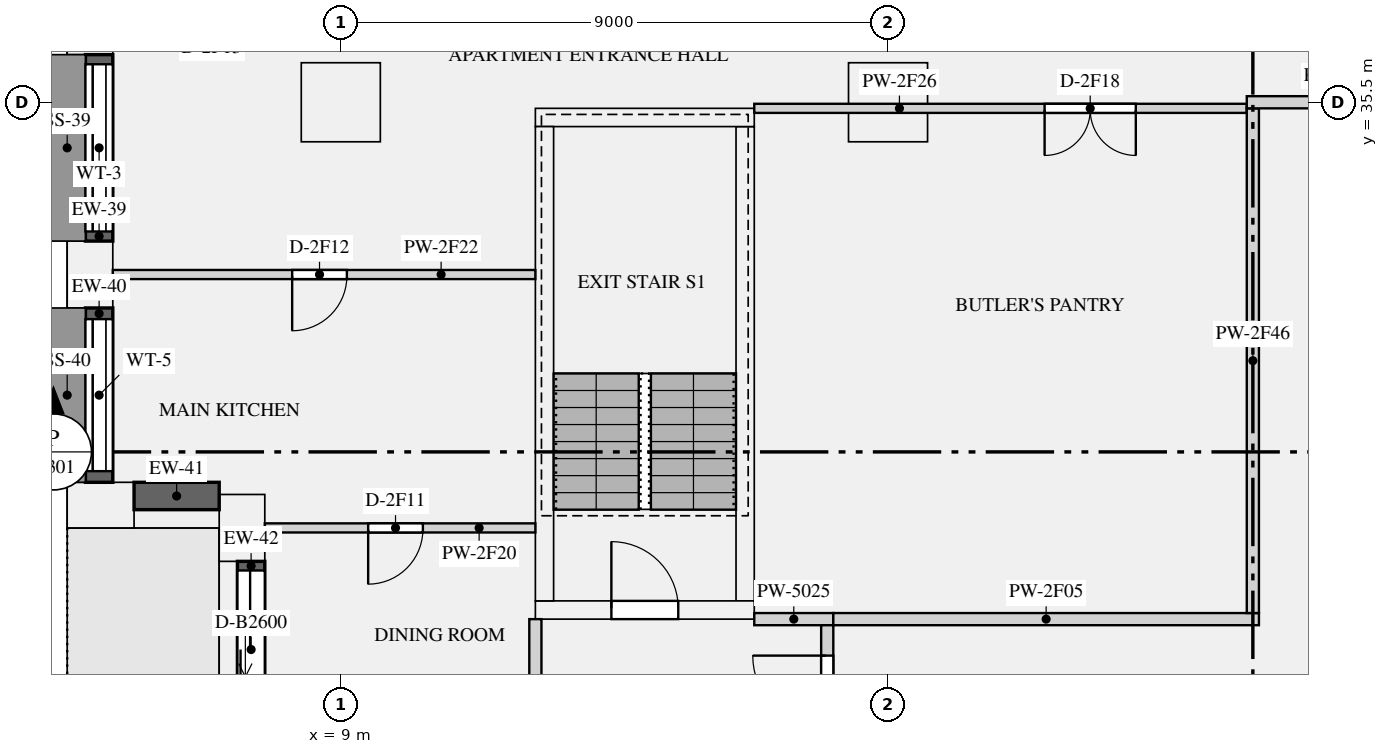
"""IFC4 building model, lengths in metres.
Left out: names, types, materials, properties, quantities, classifications, styles, units other than length and angle.
Written with IfcOpenShell. Run it as: python <this file> out.ifc"""

import sys

from ifc_helpers import new_model, si_unit, direction, frame, frame_2d, origin, origin_2d, place, context, subcontext, project, spatial, rectangle, extrude, element, fill, save


model = new_model("IFC4")
c1 = context("Model", 3, precision=1e-05, world=origin(), true_north=direction((0.0, 1.0)))
c2 = subcontext(c1, "Body", "Model", "MODEL_VIEW")
j1 = project(units=[si_unit("LENGTHUNIT", "METRE"), si_unit("PLANEANGLEUNIT", "RADIAN")], contexts=[c1])
p1 = place(None, origin())
s1 = spatial("IfcSite", under=j1, at=p1, CompositionType="ELEMENT")
p2 = place(p1, origin())
s2 = spatial("IfcBuilding", under=s1, at=p2, CompositionType="ELEMENT")
p3 = place(p2, frame((0.0, 0.0, 127.65)))
s3 = spatial("IfcBuildingStorey", under=s2, at=p3, CompositionType="ELEMENT", Elevation=127.65)
for number, where, z_axis, x_axis in (
    (1, (4.875, 36.833, 0.0), (0.0, 0.0, 1.0), (0.0, -1.0, 0.0)),
    (2, (4.875, 32.667, 0.0), (0.0, 0.0, 1.0), (0.0, -1.0, 0.0)),
    (3, (5.05, 28.875, 0.0), (0.0, 0.0, 1.0), (1.0, 0.0, 0.0)),
    (4, (7.375, 28.5, 0.0), (0.0, 0.0, 1.0), (0.0, -1.0, 0.0)),
):
    element("IfcColumn", number, at=place(p3, frame(where, z_axis=z_axis, x_axis=x_axis)), inside=s3, PredefinedType="USERDEFINED", context=c2, shape_type="SweptSolid", body=[
        extrude(rectangle(XDim=1.1, YDim=0.75, at=origin_2d()), origin(), (0.0, 0.0, 1.0), 3.15),
    ])
for number, where, z_axis, x_axis in (
    (5, (9.0, 35.5, 0.0), (0.0, 0.0, 1.0), (1.0, 0.0, 0.0)),
    (6, (18.0, 35.5, 0.0), (0.0, 0.0, 1.0), (1.0, 0.0, 0.0)),
):
    element("IfcColumn", number, at=place(p3, frame(where, z_axis=z_axis, x_axis=x_axis)), inside=s3, PredefinedType="COLUMN", context=c2, shape_type="SweptSolid", body=[
        extrude(rectangle(XDim=1.3, YDim=1.3, at=origin_2d()), origin(), (0.0, 0.0, 1.0), 3.15),
    ])
p4 = place(p3, frame((12.2, 27.15, 0.0), z_axis=(0.0, 0.0, 1.0), x_axis=(1.0, 0.0, 0.0)))
e7 = element("IfcWall", 7, at=p4, inside=s3, PredefinedType="SHEAR", context=c2, shape_type="SweptSolid", body=[
    extrude(rectangle(XDim=3.6, YDim=0.3, at=frame_2d((1.8, 0.0))), origin(), (0.0, 0.0, 1.0), 3.15),
])
p5 = place(p4, frame((1.25, 0.0, 0.0)))
e8 = element("IfcOpeningElement", 8, at=p5, cuts=e7, PredefinedType="OPENING", context=c2, shape_type="SweptSolid", body=[
    extrude(rectangle(XDim=1.1, YDim=2.1, at=frame_2d((0.55, 1.05))), frame((0.0, 0.16, 0.0), z_axis=(0.0, -1.0, 0.0), x_axis=(1.0, 0.0, 0.0)), (0.0, 0.0, 1.0), 0.32),
])
p6 = place(p3, frame((12.2, 35.25, 0.0), z_axis=(0.0, 0.0, 1.0), x_axis=(1.0, 0.0, 0.0)))
e9 = element("IfcWall", 9, at=p6, inside=s3, PredefinedType="SHEAR", context=c2, shape_type="SweptSolid", body=[
    extrude(rectangle(XDim=3.6, YDim=0.3, at=frame_2d((1.8, 0.0))), origin(), (0.0, 0.0, 1.0), 3.15),
])
for number, where, z_axis, x_axis in (
    (10, (12.35, 27.3, 0.0), (0.0, 0.0, 1.0), (0.0, 1.0, 0.0)),
    (11, (15.65, 27.3, 0.0), (0.0, 0.0, 1.0), (0.0, 1.0, 0.0)),
):
    element("IfcWall", number, at=place(p3, frame(where, z_axis=z_axis, x_axis=x_axis)), inside=s3, PredefinedType="SHEAR", context=c2, shape_type="SweptSolid", body=[
        extrude(rectangle(XDim=7.8, YDim=0.3, at=frame_2d((3.9, 0.0))), origin(), (0.0, 0.0, 1.0), 3.15),
    ])
p7 = place(p3, frame((5.025, 36.283, 0.9), z_axis=(0.0, 0.0, 1.0), x_axis=(0.0, -1.0, 0.0)))
e12 = element("IfcWall", 12, at=p7, inside=s3, PredefinedType="SOLIDWALL", context=c2, shape_type="SweptSolid", body=[
    extrude(rectangle(XDim=3.066, YDim=0.45, at=frame_2d((1.533, 0.0))), origin(), (0.0, 0.0, 1.0), 1.75),
])
p8 = place(p7, frame((0.158, 0.0, 0.15)))
e13 = element("IfcOpeningElement", 13, at=p8, cuts=e12, PredefinedType="OPENING", context=c2, shape_type="SweptSolid", body=[
    extrude(rectangle(XDim=2.75, YDim=1.5, at=frame_2d((1.375, 0.75))), frame((0.0, 0.235, 0.0), z_axis=(0.0, -1.0, 0.0), x_axis=(1.0, 0.0, 0.0)), (0.0, 0.0, 1.0), 0.47),
])
p9 = place(p3, frame((5.025, 32.117, 0.9), z_axis=(0.0, 0.0, 1.0), x_axis=(0.0, -1.0, 0.0)))
e14 = element("IfcWall", 14, at=p9, inside=s3, PredefinedType="SOLIDWALL", context=c2, shape_type="SweptSolid", body=[
    extrude(rectangle(XDim=2.867, YDim=0.45, at=frame_2d((1.434, 0.0))), origin(), (0.0, 0.0, 1.0), 1.75),
])
p10 = place(p9, frame((0.184, 0.0, 0.15)))
e15 = element("IfcOpeningElement", 15, at=p10, cuts=e14, PredefinedType="OPENING", context=c2, shape_type="SweptSolid", body=[
    extrude(rectangle(XDim=2.5, YDim=1.5, at=frame_2d((1.25, 0.75))), frame((0.0, 0.235, 0.0), z_axis=(0.0, -1.0, 0.0), x_axis=(1.0, 0.0, 0.0)), (0.0, 0.0, 1.0), 0.47),
])
p11 = place(p3, frame((5.6, 29.025, 0.9), z_axis=(0.0, 0.0, 1.0), x_axis=(1.0, 0.0, 0.0)))
e16 = element("IfcWall", 16, at=p11, inside=s3, PredefinedType="SOLIDWALL", context=c2, shape_type="SweptSolid", body=[
    extrude(rectangle(XDim=1.4, YDim=0.45, at=frame_2d((0.7, 0.0))), origin(), (0.0, 0.0, 1.0), 1.75),
])
p12 = place(p3, frame((7.525, 27.95, 0.0), z_axis=(0.0, 0.0, 1.0), x_axis=(0.0, -1.0, 0.0)))
e17 = element("IfcWall", 17, at=p12, inside=s3, PredefinedType="SOLIDWALL", context=c2, shape_type="SweptSolid", body=[
    extrude(rectangle(XDim=2.9, YDim=0.45, at=frame_2d((1.45, 0.0))), origin(), (0.0, 0.0, 1.0), 2.65),
])
p13 = place(p12, frame((0.15, 0.0, 0.0)))
e18 = element("IfcOpeningElement", 18, at=p13, cuts=e17, PredefinedType="OPENING", context=c2, shape_type="SweptSolid", body=[
    extrude(rectangle(XDim=2.6, YDim=2.3, at=frame_2d((1.3, 1.15))), frame((0.0, 0.235, 0.0), z_axis=(0.0, -1.0, 0.0), x_axis=(1.0, 0.0, 0.0)), (0.0, 0.0, 1.0), 0.47),
])
p14 = place(p3, frame((15.8, 27.0, 0.0), z_axis=(0.0, 0.0, 1.0), x_axis=(1.0, 0.0, 0.0)))
e19 = element("IfcWall", 19, at=p14, inside=s3, PredefinedType="PARTITIONING", context=c2, shape_type="SweptSolid", body=[
    extrude(rectangle(XDim=1.3, YDim=0.2, at=frame_2d((0.65, 0.0))), origin(), (0.0, 0.0, 1.0), 2.65),
])
p15 = place(p3, frame((12.2, 23.1, 0.0), z_axis=(0.0, 0.0, 1.0), x_axis=(0.0, 1.0, 0.0)))
e20 = element("IfcWall", 20, at=p15, inside=s3, PredefinedType="PARTITIONING", context=c2, shape_type="SweptSolid", body=[
    extrude(rectangle(XDim=3.9, YDim=0.2, at=frame_2d((1.95, 0.0))), origin(), (0.0, 0.0, 1.0), 2.65),
])
p16 = place(p3, frame((17.0, 23.1, 0.0), z_axis=(0.0, 0.0, 1.0), x_axis=(0.0, 1.0, 0.0)))
e21 = element("IfcWall", 21, at=p16, inside=s3, PredefinedType="PARTITIONING", context=c2, shape_type="SweptSolid", body=[
    extrude(rectangle(XDim=3.8, YDim=0.2, at=frame_2d((1.9, 0.0))), origin(), (0.0, 0.0, 1.0), 2.65),
])
p17 = place(p16, frame((2.1, 0.0, 0.0)))
e22 = element("IfcOpeningElement", 22, at=p17, cuts=e21, PredefinedType="OPENING", context=c2, shape_type="SweptSolid", body=[
    extrude(rectangle(XDim=1.2, YDim=2.1, at=frame_2d((0.6, 1.05))), frame((0.0, 0.11, 0.0), z_axis=(0.0, -1.0, 0.0), x_axis=(1.0, 0.0, 0.0)), (0.0, 0.0, 1.0), 0.22),
])
p18 = place(p3, frame((17.1, 27.0, 0.0), z_axis=(0.0, 0.0, 1.0), x_axis=(1.0, 0.0, 0.0)))
e23 = element("IfcWall", 23, at=p18, inside=s3, PredefinedType="PARTITIONING", context=c2, shape_type="SweptSolid", body=[
    extrude(rectangle(XDim=7.0, YDim=0.2, at=frame_2d((3.5, 0.0))), origin(), (0.0, 0.0, 1.0), 2.65),
])
p19 = place(p3, frame((23.9, 35.5, 0.0), z_axis=(0.0, 0.0, 1.0), x_axis=(1.0, 0.0, 0.0)))
e24 = element("IfcWall", 24, at=p19, inside=s3, PredefinedType="PARTITIONING", context=c2, shape_type="SweptSolid", body=[
    extrude(rectangle(XDim=3.1, YDim=0.2, at=frame_2d((1.55, 0.0))), origin(), (0.0, 0.0, 1.0), 2.65),
])
p20 = place(p3, frame((7.75, 28.5, 0.0), z_axis=(0.0, 0.0, 1.0), x_axis=(1.0, 0.0, 0.0)))
e25 = element("IfcWall", 25, at=p20, inside=s3, PredefinedType="PARTITIONING", context=c2, shape_type="SweptSolid", body=[
    extrude(rectangle(XDim=4.45, YDim=0.15, at=frame_2d((2.225, 0.0))), origin(), (0.0, 0.0, 1.0), 2.65),
])
p21 = place(p20, frame((1.7, 0.0, 0.0)))
e26 = element("IfcOpeningElement", 26, at=p21, cuts=e25, PredefinedType="OPENING", context=c2, shape_type="SweptSolid", body=[
    extrude(rectangle(XDim=0.9, YDim=2.1, at=frame_2d((0.45, 1.05))), frame((0.0, 0.085, 0.0), z_axis=(0.0, -1.0, 0.0), x_axis=(1.0, 0.0, 0.0)), (0.0, 0.0, 1.0), 0.17),
])
p22 = place(p3, frame((5.25, 32.667, 0.0), z_axis=(0.0, 0.0, 1.0), x_axis=(1.0, 0.0, 0.0)))
e27 = element("IfcWall", 27, at=p22, inside=s3, PredefinedType="PARTITIONING", context=c2, shape_type="SweptSolid", body=[
    extrude(rectangle(XDim=6.95, YDim=0.15, at=frame_2d((3.475, 0.0))), origin(), (0.0, 0.0, 1.0), 2.65),
])
p23 = place(p22, frame((2.95, 0.0, 0.0)))
e28 = element("IfcOpeningElement", 28, at=p23, cuts=e27, PredefinedType="OPENING", context=c2, shape_type="SweptSolid", body=[
    extrude(rectangle(XDim=0.9, YDim=2.1, at=frame_2d((0.45, 1.05))), frame((0.0, 0.085, 0.0), z_axis=(0.0, -1.0, 0.0), x_axis=(1.0, 0.0, 0.0)), (0.0, 0.0, 1.0), 0.17),
])
p24 = place(p3, frame((15.8, 35.4, 0.0), z_axis=(0.0, 0.0, 1.0), x_axis=(1.0, 0.0, 0.0)))
e29 = element("IfcWall", 29, at=p24, inside=s3, PredefinedType="PARTITIONING", context=c2, shape_type="SweptSolid", body=[
    extrude(rectangle(XDim=8.1, YDim=0.15, at=frame_2d((4.05, 0.0))), origin(), (0.0, 0.0, 1.0), 2.65),
])
p25 = place(p24, frame((4.775, 0.0, 0.0)))
e30 = element("IfcOpeningElement", 30, at=p25, cuts=e29, PredefinedType="OPENING", context=c2, shape_type="SweptSolid", body=[
    extrude(rectangle(XDim=1.5, YDim=2.1, at=frame_2d((0.75, 1.05))), frame((0.0, 0.085, 0.0), z_axis=(0.0, -1.0, 0.0), x_axis=(1.0, 0.0, 0.0)), (0.0, 0.0, 1.0), 0.17),
])
p26 = place(p3, frame((24.0, 27.1, 0.0), z_axis=(0.0, 0.0, 1.0), x_axis=(0.0, 1.0, 0.0)))
e31 = element("IfcWall", 31, at=p26, inside=s3, PredefinedType="PARTITIONING", context=c2, shape_type="SweptSolid", body=[
    extrude(rectangle(XDim=8.3, YDim=0.2, at=frame_2d((4.15, 0.0))), origin(), (0.0, 0.0, 1.0), 2.65),
])
p27 = place(p8, origin())
e32 = element("IfcWindow", 32, at=p27, inside=s3, PartitioningType="SINGLE_PANEL", PredefinedType="WINDOW", context=c2, shape_type="SweptSolid", body=[
    extrude(rectangle(XDim=2.75, YDim=1.5, at=frame_2d((1.375, 0.75))), frame((0.0, -0.065, 0.0), z_axis=(0.0, -1.0, 0.0), x_axis=(1.0, 0.0, 0.0)), (0.0, 0.0, 1.0), 0.06),
])
fill(e13, e32)
p28 = place(p10, origin())
e33 = element("IfcWindow", 33, at=p28, inside=s3, PartitioningType="SINGLE_PANEL", PredefinedType="WINDOW", context=c2, shape_type="SweptSolid", body=[
    extrude(rectangle(XDim=2.5, YDim=1.5, at=frame_2d((1.25, 0.75))), frame((0.0, -0.065, 0.0), z_axis=(0.0, -1.0, 0.0), x_axis=(1.0, 0.0, 0.0)), (0.0, 0.0, 1.0), 0.06),
])
fill(e15, e33)
p29 = place(p13, origin())
e34 = element("IfcDoor", 34, at=p29, inside=s3, OperationType="SLIDING_TO_LEFT", PredefinedType="DOOR", context=c2, shape_type="SweptSolid", body=[
    extrude(rectangle(XDim=2.6, YDim=2.3, at=frame_2d((1.3, 1.15))), frame((0.0, -0.07, 0.0), z_axis=(0.0, -1.0, 0.0), x_axis=(1.0, 0.0, 0.0)), (0.0, 0.0, 1.0), 0.05),
])
fill(e18, e34)
p30 = place(p5, origin())
e35 = element("IfcDoor", 35, at=p30, inside=s3, OperationType="SINGLE_SWING_LEFT", PredefinedType="DOOR", context=c2, shape_type="SweptSolid", body=[
    extrude(rectangle(XDim=1.1, YDim=2.1, at=frame_2d((0.55, 1.05))), frame((0.0, 0.025, 0.0), z_axis=(0.0, -1.0, 0.0), x_axis=(1.0, 0.0, 0.0)), (0.0, 0.0, 1.0), 0.05),
])
fill(e8, e35)
p31 = place(p17, origin())
e36 = element("IfcDoor", 36, at=p31, inside=s3, OperationType="SINGLE_SWING_RIGHT", PredefinedType="DOOR", context=c2, shape_type="SweptSolid", body=[
    extrude(rectangle(XDim=1.2, YDim=2.1, at=frame_2d((0.6, 1.05))), frame((0.0, 0.025, 0.0), z_axis=(0.0, -1.0, 0.0), x_axis=(1.0, 0.0, 0.0)), (0.0, 0.0, 1.0), 0.05),
])
fill(e22, e36)
p32 = place(p21, frame((0.9, 0.0, 0.0), z_axis=(0.0, 0.0, 1.0), x_axis=(-1.0, 0.0, 0.0)))
e37 = element("IfcDoor", 37, at=p32, inside=s3, OperationType="SINGLE_SWING_RIGHT", PredefinedType="DOOR", context=c2, shape_type="SweptSolid", body=[
    extrude(rectangle(XDim=0.9, YDim=2.1, at=frame_2d((0.45, 1.05))), frame((0.0, 0.025, 0.0), z_axis=(0.0, -1.0, 0.0), x_axis=(1.0, 0.0, 0.0)), (0.0, 0.0, 1.0), 0.05),
])
fill(e26, e37)
p33 = place(p23, frame((0.9, 0.0, 0.0), z_axis=(0.0, 0.0, 1.0), x_axis=(-1.0, 0.0, 0.0)))
e38 = element("IfcDoor", 38, at=p33, inside=s3, OperationType="SINGLE_SWING_RIGHT", PredefinedType="DOOR", context=c2, shape_type="SweptSolid", body=[
    extrude(rectangle(XDim=0.9, YDim=2.1, at=frame_2d((0.45, 1.05))), frame((0.0, 0.025, 0.0), z_axis=(0.0, -1.0, 0.0), x_axis=(1.0, 0.0, 0.0)), (0.0, 0.0, 1.0), 0.05),
])
fill(e28, e38)
p34 = place(p25, frame((1.5, 0.0, 0.0), z_axis=(0.0, 0.0, 1.0), x_axis=(-1.0, 0.0, 0.0)))
e39 = element("IfcDoor", 39, at=p34, inside=s3, OperationType="DOUBLE_DOOR_SINGLE_SWING", PredefinedType="DOOR", context=c2, shape_type="SweptSolid", body=[
    extrude(rectangle(XDim=1.5, YDim=2.1, at=frame_2d((0.75, 1.05))), frame((0.0, 0.025, 0.0), z_axis=(0.0, -1.0, 0.0), x_axis=(1.0, 0.0, 0.0)), (0.0, 0.0, 1.0), 0.05),
])
fill(e30, e39)
save(model, sys.argv[1])
